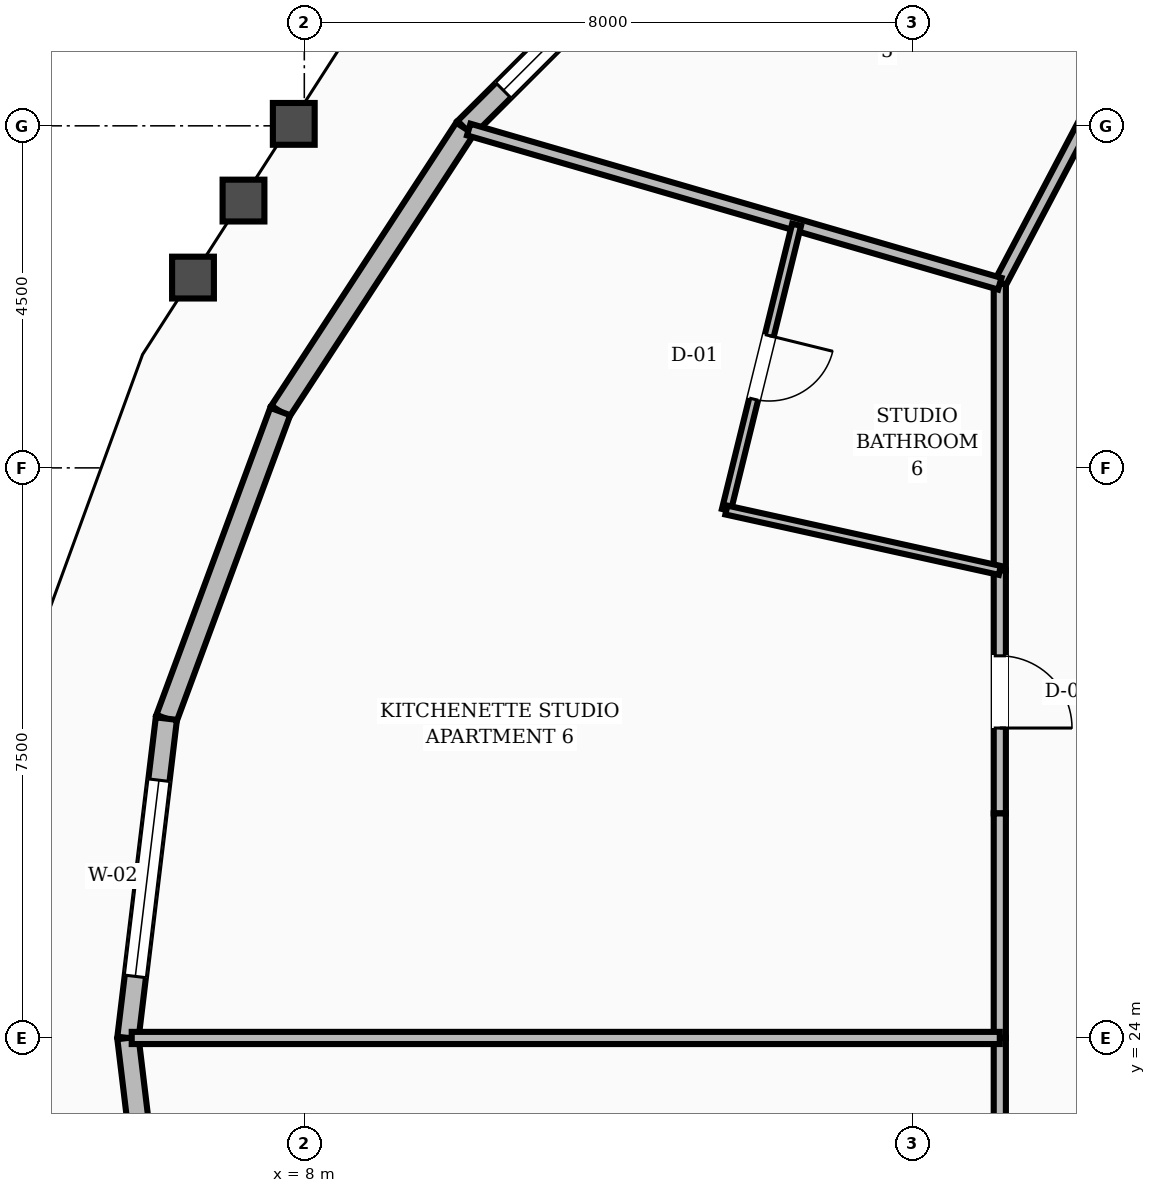
"""IFC4 building model, lengths in metres.
Left out: names, types, materials, properties, quantities, classifications, styles, units other than length and angle.
Written with IfcOpenShell. Run it as: python <this file> out.ifc"""

import sys

from ifc_helpers import new_model, si_unit, direction, frame, frame_2d, origin, place, context, subcontext, project, spatial, rectangle, extrude, element, fill, save


model = new_model("IFC4")
c1 = context("Model", 3, precision=1e-05, world=origin(), true_north=direction((0.0, 1.0)))
c2 = subcontext(c1, "Body", "Model", "MODEL_VIEW")
j1 = project(units=[si_unit("LENGTHUNIT", "METRE"), si_unit("PLANEANGLEUNIT", "RADIAN")], contexts=[c1])
p1 = place(None, origin())
s1 = spatial("IfcSite", under=j1, at=p1, CompositionType="ELEMENT")
p2 = place(p1, origin())
s2 = spatial("IfcBuilding", under=s1, at=p2, CompositionType="ELEMENT")
p3 = place(p2, frame((0.0, 0.0, 153.2)))
s3 = spatial("IfcBuildingStorey", under=s2, at=p3, CompositionType="ELEMENT", Elevation=153.2)
p4 = place(p3, frame((13.388, 39.229, 0.0), z_axis=(0.0, 0.0, 1.0), x_axis=(-0.708162399008, -0.706049585108, 0.0)))
e1 = element("IfcWall", 1, at=p4, inside=s3, PredefinedType="STANDARD", context=c2, shape_type="SweptSolid", body=[
    extrude(rectangle(XDim=4.622, YDim=0.28, at=frame_2d((2.311, 0.0))), origin(), (0.0, 0.0, 1.0), 2.82),
])
p5 = place(p4, frame((0.711, 0.0, 0.8)))
e2 = element("IfcOpeningElement", 2, at=p5, cuts=e1, PredefinedType="OPENING", context=c2, shape_type="SweptSolid", body=[
    extrude(rectangle(XDim=3.2, YDim=1.65, at=frame_2d((1.6, 0.825))), frame((0.0, 0.15, 0.0), z_axis=(0.0, -1.0, 0.0), x_axis=(1.0, 0.0, 0.0)), (0.0, 0.0, 1.0), 0.3),
])
p6 = place(p3, frame((10.115, 35.965, 0.0), z_axis=(0.0, 0.0, 1.0), x_axis=(-0.546910623985, -0.837190999338, 0.0)))
e3 = element("IfcWall", 3, at=p6, inside=s3, PredefinedType="STANDARD", context=c2, shape_type="SweptSolid", body=[
    extrude(rectangle(XDim=4.448, YDim=0.28, at=frame_2d((2.224, 0.0))), origin(), (0.0, 0.0, 1.0), 2.82),
])
p7 = place(p3, frame((7.683, 32.242, 0.0), z_axis=(0.0, 0.0, 1.0), x_axis=(-0.347600366377, -0.937642781284, 0.0)))
e4 = element("IfcWall", 4, at=p7, inside=s3, PredefinedType="STANDARD", context=c2, shape_type="SweptSolid", body=[
    extrude(rectangle(XDim=4.309, YDim=0.28, at=frame_2d((2.155, 0.0))), origin(), (0.0, 0.0, 1.0), 2.82),
])
p8 = place(p3, frame((6.185, 28.201, 0.0), z_axis=(0.0, 0.0, 1.0), x_axis=(-0.119481907098, -0.992836378199, 0.0)))
e5 = element("IfcWall", 5, at=p8, inside=s3, PredefinedType="STANDARD", context=c2, shape_type="SweptSolid", body=[
    extrude(rectangle(XDim=4.232, YDim=0.28, at=frame_2d((2.116, 0.0))), origin(), (0.0, 0.0, 1.0), 2.82),
])
p9 = place(p8, frame((0.816, 0.0, 0.8)))
e6 = element("IfcOpeningElement", 6, at=p9, cuts=e5, PredefinedType="OPENING", context=c2, shape_type="SweptSolid", body=[
    extrude(rectangle(XDim=2.6, YDim=1.65, at=frame_2d((1.3, 0.825))), frame((0.0, 0.15, 0.0), z_axis=(0.0, -1.0, 0.0), x_axis=(1.0, 0.0, 0.0)), (0.0, 0.0, 1.0), 0.3),
])
p10 = place(p3, frame((5.679, 24.0, 0.0), z_axis=(0.0, 0.0, 1.0), x_axis=(0.119481907098, -0.992836378199, 0.0)))
e7 = element("IfcWall", 7, at=p10, inside=s3, PredefinedType="STANDARD", context=c2, shape_type="SweptSolid", body=[
    extrude(rectangle(XDim=4.232, YDim=0.28, at=frame_2d((2.116, 0.0))), origin(), (0.0, 0.0, 1.0), 2.82),
])
p11 = place(p3, frame((18.85, 37.15, 0.0), z_axis=(0.0, 0.0, 1.0), x_axis=(-0.466093963429, -0.884735224378, 0.0)))
e8 = element("IfcWall", 8, at=p11, inside=s3, PredefinedType="SOLIDWALL", context=c2, shape_type="SweptSolid", body=[
    extrude(rectangle(XDim=3.648, YDim=0.16, at=frame_2d((1.824, 0.0))), origin(), (0.0, 0.0, 1.0), 2.8),
])
p12 = place(p3, frame((17.15, 33.923, 0.0), z_axis=(0.0, 0.0, 1.0), x_axis=(0.0, -1.0, 0.0)))
e9 = element("IfcWall", 9, at=p12, inside=s3, PredefinedType="SOLIDWALL", context=c2, shape_type="SweptSolid", body=[
    extrude(rectangle(XDim=3.771, YDim=0.16, at=frame_2d((1.886, 0.0))), origin(), (0.0, 0.0, 1.0), 2.8),
])
p13 = place(p3, frame((17.15, 30.151, 0.0), z_axis=(0.0, 0.0, 1.0), x_axis=(0.0, -1.0, 0.0)))
e10 = element("IfcWall", 10, at=p13, inside=s3, PredefinedType="SOLIDWALL", context=c2, shape_type="SweptSolid", body=[
    extrude(rectangle(XDim=3.197, YDim=0.16, at=frame_2d((1.599, 0.0))), origin(), (0.0, 0.0, 1.0), 2.8),
])
p14 = place(p13, frame((1.124, 0.0, 0.0)))
e11 = element("IfcOpeningElement", 11, at=p14, cuts=e10, PredefinedType="OPENING", context=c2, shape_type="SweptSolid", body=[
    extrude(rectangle(XDim=0.95, YDim=2.1, at=frame_2d((0.475, 1.05))), frame((0.0, 0.09, 0.0), z_axis=(0.0, -1.0, 0.0), x_axis=(1.0, 0.0, 0.0)), (0.0, 0.0, 1.0), 0.18),
])
for number, where, z_axis, x_axis in (
    (12, (17.15, 26.954, 0.0), (0.0, 0.0, 1.0), (0.0, -1.0, 0.0)),
    (13, (17.15, 24.0, 0.0), (0.0, 0.0, 1.0), (0.0, -1.0, 0.0)),
):
    element("IfcWall", number, at=place(p3, frame(where, z_axis=z_axis, x_axis=x_axis)), inside=s3, PredefinedType="SOLIDWALL", context=c2, shape_type="SweptSolid", body=[
        extrude(rectangle(XDim=2.954, YDim=0.16, at=frame_2d((1.477, 0.0))), origin(), (0.0, 0.0, 1.0), 2.8),
    ])
p15 = place(p3, frame((17.15, 33.923, 0.0), z_axis=(0.0, 0.0, 1.0), x_axis=(-0.960341299292, 0.278827166672, 0.0)))
e14 = element("IfcWall", 14, at=p15, inside=s3, PredefinedType="SOLIDWALL", context=c2, shape_type="SweptSolid", body=[
    extrude(rectangle(XDim=7.275, YDim=0.16, at=frame_2d((3.638, 0.0))), origin(), (0.0, 0.0, 1.0), 2.8),
])
p16 = place(p3, frame((14.477, 34.699, 0.0), z_axis=(0.0, 0.0, 1.0), x_axis=(-0.23913082273, -0.970987358116, 0.0)))
e15 = element("IfcWall", 15, at=p16, inside=s3, PredefinedType="PARTITIONING", context=c2, shape_type="SweptSolid", body=[
    extrude(rectangle(XDim=3.865, YDim=0.12, at=frame_2d((1.933, 0.0))), origin(), (0.0, 0.0, 1.0), 2.8),
])
p17 = place(p16, frame((1.503, 0.0, 0.0)))
e16 = element("IfcOpeningElement", 16, at=p17, cuts=e15, PredefinedType="OPENING", context=c2, shape_type="SweptSolid", body=[
    extrude(rectangle(XDim=0.86, YDim=2.1, at=frame_2d((0.43, 1.05))), frame((0.0, 0.07, 0.0), z_axis=(0.0, -1.0, 0.0), x_axis=(1.0, 0.0, 0.0)), (0.0, 0.0, 1.0), 0.14),
])
p18 = place(p3, frame((17.15, 30.151, 0.0), z_axis=(0.0, 0.0, 1.0), x_axis=(-0.976473112026, 0.215639192842, 0.0)))
e17 = element("IfcWall", 17, at=p18, inside=s3, PredefinedType="PARTITIONING", context=c2, shape_type="SweptSolid", body=[
    extrude(rectangle(XDim=3.684, YDim=0.12, at=frame_2d((1.842, 0.0))), origin(), (0.0, 0.0, 1.0), 2.8),
])
p19 = place(p3, frame((17.15, 24.0, 0.0), z_axis=(0.0, 0.0, 1.0), x_axis=(-1.0, 0.0, 0.0)))
e18 = element("IfcWall", 18, at=p19, inside=s3, PredefinedType="SOLIDWALL", context=c2, shape_type="SweptSolid", body=[
    extrude(rectangle(XDim=11.42, YDim=0.16, at=frame_2d((5.71, 0.0))), origin(), (0.0, 0.0, 1.0), 2.8),
])
p20 = place(p5, origin())
e19 = element("IfcWindow", 19, at=p20, inside=s3, PartitioningType="SINGLE_PANEL", PredefinedType="WINDOW", context=c2, shape_type="SweptSolid", body=[
    extrude(rectangle(XDim=3.2, YDim=1.65, at=frame_2d((1.6, 0.825))), frame((0.0, 0.03, 0.0), z_axis=(0.0, -1.0, 0.0), x_axis=(1.0, 0.0, 0.0)), (0.0, 0.0, 1.0), 0.06),
])
fill(e2, e19)
p21 = place(p9, origin())
e20 = element("IfcWindow", 20, at=p21, inside=s3, PartitioningType="SINGLE_PANEL", PredefinedType="WINDOW", context=c2, shape_type="SweptSolid", body=[
    extrude(rectangle(XDim=2.6, YDim=1.65, at=frame_2d((1.3, 0.825))), frame((0.0, 0.03, 0.0), z_axis=(0.0, -1.0, 0.0), x_axis=(1.0, 0.0, 0.0)), (0.0, 0.0, 1.0), 0.06),
])
fill(e6, e20)
p22 = place(p17, origin())
e21 = element("IfcDoor", 21, at=p22, inside=s3, OperationType="SINGLE_SWING_LEFT", PredefinedType="DOOR", context=c2, shape_type="SweptSolid", body=[
    extrude(rectangle(XDim=0.86, YDim=2.1, at=frame_2d((0.43, 1.05))), frame((0.0, 0.025, 0.0), z_axis=(0.0, -1.0, 0.0), x_axis=(1.0, 0.0, 0.0)), (0.0, 0.0, 1.0), 0.05),
])
fill(e16, e21)
p23 = place(p14, origin())
e22 = element("IfcDoor", 22, at=p23, inside=s3, OperationType="SINGLE_SWING_RIGHT", PredefinedType="DOOR", context=c2, shape_type="SweptSolid", body=[
    extrude(rectangle(XDim=0.95, YDim=2.1, at=frame_2d((0.475, 1.05))), frame((0.0, 0.025, 0.0), z_axis=(0.0, -1.0, 0.0), x_axis=(1.0, 0.0, 0.0)), (0.0, 0.0, 1.0), 0.05),
])
fill(e11, e22)
save(model, sys.argv[1])
